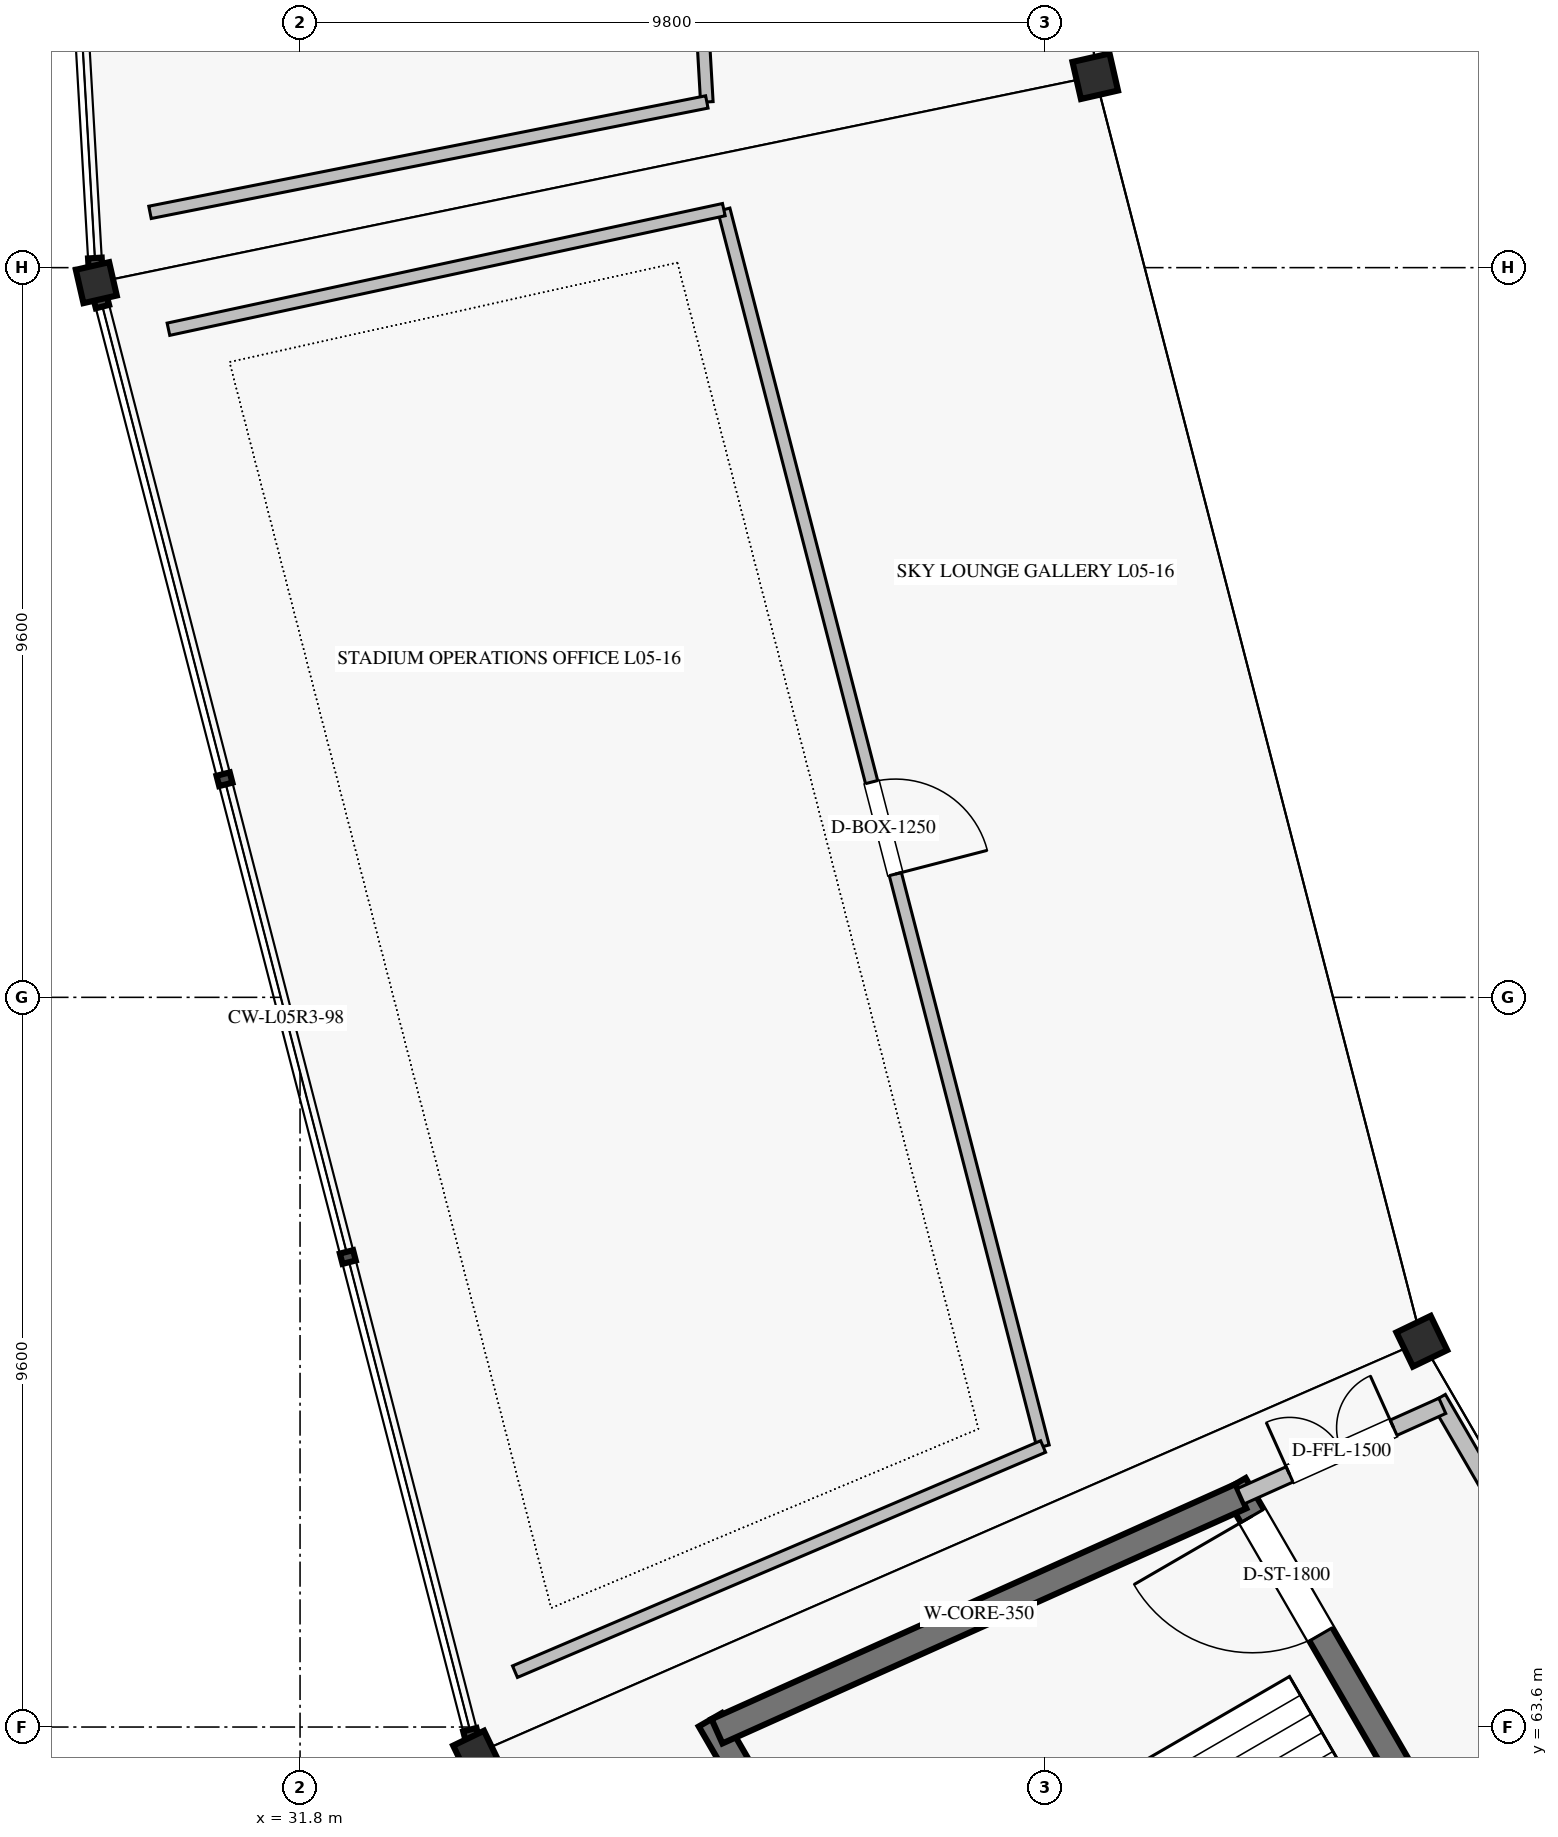
"""IFC4 building model, lengths in metres.
Left out: names, types, materials, properties, quantities, classifications, styles, units other than length and angle.
Written with IfcOpenShell. Run it as: python <this file> out.ifc"""

import sys

from ifc_helpers import new_model, si_unit, direction, frame, frame_2d, origin, origin_2d, place, context, subcontext, project, spatial, rectangle, hollow_rectangle, extrude, element, fill, save


model = new_model("IFC4")
c1 = context("Model", 3, precision=1e-05, world=origin(), true_north=direction((0.0, 1.0)))
c2 = subcontext(c1, "Body", "Model", "MODEL_VIEW")
j1 = project(units=[si_unit("LENGTHUNIT", "METRE"), si_unit("PLANEANGLEUNIT", "RADIAN")], contexts=[c1])
p1 = place(None, origin())
s1 = spatial("IfcSite", under=j1, at=p1, CompositionType="ELEMENT")
p2 = place(p1, origin())
s2 = spatial("IfcBuilding", under=s1, at=p2, CompositionType="ELEMENT")
p3 = place(p2, frame((0.0, 0.0, 25.84)))
s3 = spatial("IfcBuildingStorey", under=s2, at=p3, CompositionType="ELEMENT", Elevation=25.84)
for number, where, z_axis, x_axis in (
    (1, (42.262, 85.318, 0.0), (0.0, 0.0, 1.0), (-0.975, -0.223, 0.0)),
    (2, (46.559, 68.675, 0.0), (0.0, 0.0, 1.0), (-0.901, -0.434, 0.0)),
):
    element("IfcColumn", number, at=place(p3, frame(where, z_axis=z_axis, x_axis=x_axis)), inside=s3, PredefinedType="COLUMN", context=c2, shape_type="SweptSolid", body=[
        extrude(hollow_rectangle(XDim=0.5, YDim=0.5, WallThickness=0.022, at=origin_2d()), origin(), (0.0, 0.0, 1.0), 5.44),
    ])
for number, where, z_axis, x_axis in (
    (3, (29.119, 82.602, 0.0), (0.0, 0.0, 1.0), (-0.975, -0.223, 0.0)),
    (4, (34.115, 63.25, 0.0), (0.0, 0.0, 1.0), (-0.901, -0.434, 0.0)),
):
    element("IfcColumn", number, at=place(p3, frame(where, z_axis=z_axis, x_axis=x_axis)), inside=s3, PredefinedType="COLUMN", context=c2, shape_type="SweptSolid", body=[
        extrude(hollow_rectangle(XDim=0.45, YDim=0.45, WallThickness=0.022, at=origin_2d()), origin(), (0.0, 0.0, 1.0), 5.44),
    ])
p4 = place(p3, frame((44.09, 66.788, 0.0), z_axis=(0.0, 0.0, 1.0), x_axis=(0.501628624814, -0.865083072755, 0.0)))
e5 = element("IfcWall", 5, at=p4, inside=s3, PredefinedType="SHEAR", context=c2, shape_type="SweptSolid", body=[
    extrude(rectangle(XDim=11.435, YDim=0.35, at=frame_2d((5.718, 0.0))), origin(), (0.0, 0.0, 1.0), 5.18),
])
p5 = place(p4, frame((0.475, 0.0, 0.0)))
e6 = element("IfcOpeningElement", 6, at=p5, cuts=e5, PredefinedType="OPENING", context=c2, shape_type="SweptSolid", body=[
    extrude(rectangle(XDim=1.8, YDim=2.2, at=frame_2d((0.9, 1.1))), frame((0.0, 0.185, 0.0), z_axis=(0.0, -1.0, 0.0), x_axis=(1.0, 0.0, 0.0)), (0.0, 0.0, 1.0), 0.37),
])
p6 = place(p3, frame((37.198, 63.695, 0.0), z_axis=(0.0, 0.0, 1.0), x_axis=(0.501601740165, -0.865098661577, 0.0)))
e7 = element("IfcWall", 7, at=p6, inside=s3, PredefinedType="SHEAR", context=c2, shape_type="SweptSolid", body=[
    extrude(rectangle(XDim=12.405, YDim=0.35, at=frame_2d((6.202, 0.0))), origin(), (0.0, 0.0, 1.0), 5.18),
])
p7 = place(p3, frame((44.178, 66.636, 0.0), z_axis=(0.0, 0.0, 1.0), x_axis=(-0.912385324524, -0.409332407212, 0.0)))
e8 = element("IfcWall", 8, at=p7, inside=s3, PredefinedType="SHEAR", context=c2, shape_type="SweptSolid", body=[
    extrude(rectangle(XDim=7.554, YDim=0.35, at=frame_2d((3.777, 0.0))), origin(), (0.0, 0.0, 1.0), 5.18),
])
p8 = place(p3, frame((46.774, 67.921, 0.0), z_axis=(0.0, 0.0, 1.0), x_axis=(0.501612626242, -0.865092349518, 0.0)))
e9 = element("IfcWall", 9, at=p8, inside=s3, PredefinedType="SOLIDWALL", context=c2, shape_type="SweptSolid", body=[
    extrude(rectangle(XDim=16.11, YDim=0.22, at=frame_2d((8.055, 0.0))), origin(), (0.0, 0.0, 1.0), 5.18),
])
p9 = place(p3, frame((46.829, 67.826, 0.0), z_axis=(0.0, 0.0, 1.0), x_axis=(-0.912378422162, -0.409347791949, 0.0)))
e10 = element("IfcWall", 10, at=p9, inside=s3, PredefinedType="SOLIDWALL", context=c2, shape_type="SweptSolid", body=[
    extrude(rectangle(XDim=2.906, YDim=0.22, at=frame_2d((1.453, 0.0))), origin(), (0.0, 0.0, 1.0), 5.18),
])
p10 = place(p9, frame((0.703, 0.0, 0.0)))
e11 = element("IfcOpeningElement", 11, at=p10, cuts=e10, PredefinedType="OPENING", context=c2, shape_type="SweptSolid", body=[
    extrude(rectangle(XDim=1.5, YDim=2.2, at=frame_2d((0.75, 1.1))), frame((0.0, 0.12, 0.0), z_axis=(0.0, -1.0, 0.0), x_axis=(1.0, 0.0, 0.0)), (0.0, 0.0, 1.0), 0.24),
])
p11 = place(p3, frame((36.211, 101.291, 0.0), z_axis=(0.0, 0.0, 1.0), x_axis=(0.057605127437, -0.998339445927, 0.0)))
e12 = element("IfcWall", 12, at=p11, inside=s3, PredefinedType="PARTITIONING", context=c2, shape_type="SweptSolid", body=[
    extrude(rectangle(XDim=16.338, YDim=0.165, at=frame_2d((8.169, 0.0))), origin(), (0.0, 0.0, 1.0), 4.5),
])
p12 = place(p11, frame((7.694, 0.0, 0.0)))
e13 = element("IfcOpeningElement", 13, at=p12, cuts=e12, PredefinedType="OPENING", context=c2, shape_type="SweptSolid", body=[
    extrude(rectangle(XDim=0.95, YDim=2.15, at=frame_2d((0.475, 1.075))), frame((0.0, 0.093, 0.0), z_axis=(0.0, -1.0, 0.0), x_axis=(1.0, 0.0, 0.0)), (0.0, 0.0, 1.0), 0.185),
])
p13 = place(p3, frame((37.152, 84.98, 0.0), z_axis=(0.0, 0.0, 1.0), x_axis=(-0.980903700741, -0.194494035571, 0.0)))
e14 = element("IfcWall", 14, at=p13, inside=s3, PredefinedType="PARTITIONING", context=c2, shape_type="SweptSolid", body=[
    extrude(rectangle(XDim=7.469, YDim=0.165, at=frame_2d((3.734, 0.0))), origin(), (0.0, 0.0, 1.0), 4.5),
])
p14 = place(p3, frame((37.375, 83.563, 0.0), z_axis=(0.0, 0.0, 1.0), x_axis=(0.249966328054, -0.968254529986, 0.0)))
e15 = element("IfcWall", 15, at=p14, inside=s3, PredefinedType="PARTITIONING", context=c2, shape_type="SweptSolid", body=[
    extrude(rectangle(XDim=16.806, YDim=0.165, at=frame_2d((8.403, 0.0))), origin(), (0.0, 0.0, 1.0), 4.5),
])
p15 = place(p14, frame((7.778, 0.0, 0.0)))
e16 = element("IfcOpeningElement", 16, at=p15, cuts=e15, PredefinedType="OPENING", context=c2, shape_type="SweptSolid", body=[
    extrude(rectangle(XDim=1.25, YDim=2.25, at=frame_2d((0.625, 1.125))), frame((0.0, 0.093, 0.0), z_axis=(0.0, -1.0, 0.0), x_axis=(1.0, 0.0, 0.0)), (0.0, 0.0, 1.0), 0.185),
])
p16 = place(p3, frame((37.375, 83.563, 0.0), z_axis=(0.0, 0.0, 1.0), x_axis=(-0.977591606225, -0.210510454464, 0.0)))
e17 = element("IfcWall", 17, at=p16, inside=s3, PredefinedType="PARTITIONING", context=c2, shape_type="SweptSolid", body=[
    extrude(rectangle(XDim=7.475, YDim=0.165, at=frame_2d((3.737, 0.0))), origin(), (0.0, 0.0, 1.0), 4.5),
])
p17 = place(p3, frame((41.576, 67.291, 0.0), z_axis=(0.0, 0.0, 1.0), x_axis=(-0.919898990597, -0.39215538642, 0.0)))
e18 = element("IfcWall", 18, at=p17, inside=s3, PredefinedType="PARTITIONING", context=c2, shape_type="SweptSolid", body=[
    extrude(rectangle(XDim=7.553, YDim=0.165, at=frame_2d((3.777, 0.0))), origin(), (0.0, 0.0, 1.0), 4.5),
])
p18 = place(p5, frame((1.8, 0.0, 0.0), z_axis=(0.0, 0.0, 1.0), x_axis=(-1.0, 0.0, 0.0)))
e19 = element("IfcDoor", 19, at=p18, inside=s3, OperationType="SINGLE_SWING_RIGHT", PredefinedType="DOOR", context=c2, shape_type="SweptSolid", body=[
    extrude(rectangle(XDim=1.8, YDim=2.2, at=frame_2d((0.9, 1.1))), frame((0.0, 0.025, 0.0), z_axis=(0.0, -1.0, 0.0), x_axis=(1.0, 0.0, 0.0)), (0.0, 0.0, 1.0), 0.05),
])
fill(e6, e19)
p19 = place(p10, frame((1.5, 0.0, 0.0), z_axis=(0.0, 0.0, 1.0), x_axis=(-1.0, 0.0, 0.0)))
e20 = element("IfcDoor", 20, at=p19, inside=s3, OperationType="DOUBLE_DOOR_SINGLE_SWING", PredefinedType="DOOR", context=c2, shape_type="SweptSolid", body=[
    extrude(rectangle(XDim=1.5, YDim=2.2, at=frame_2d((0.75, 1.1))), frame((0.0, 0.025, 0.0), z_axis=(0.0, -1.0, 0.0), x_axis=(1.0, 0.0, 0.0)), (0.0, 0.0, 1.0), 0.05),
])
fill(e11, e20)
p20 = place(p15, origin())
e21 = element("IfcDoor", 21, at=p20, inside=s3, OperationType="SINGLE_SWING_RIGHT", PredefinedType="DOOR", context=c2, shape_type="SweptSolid", body=[
    extrude(rectangle(XDim=1.25, YDim=2.25, at=frame_2d((0.625, 1.125))), frame((0.0, 0.025, 0.0), z_axis=(0.0, -1.0, 0.0), x_axis=(1.0, 0.0, 0.0)), (0.0, 0.0, 1.0), 0.05),
])
fill(e16, e21)
save(model, sys.argv[1])
